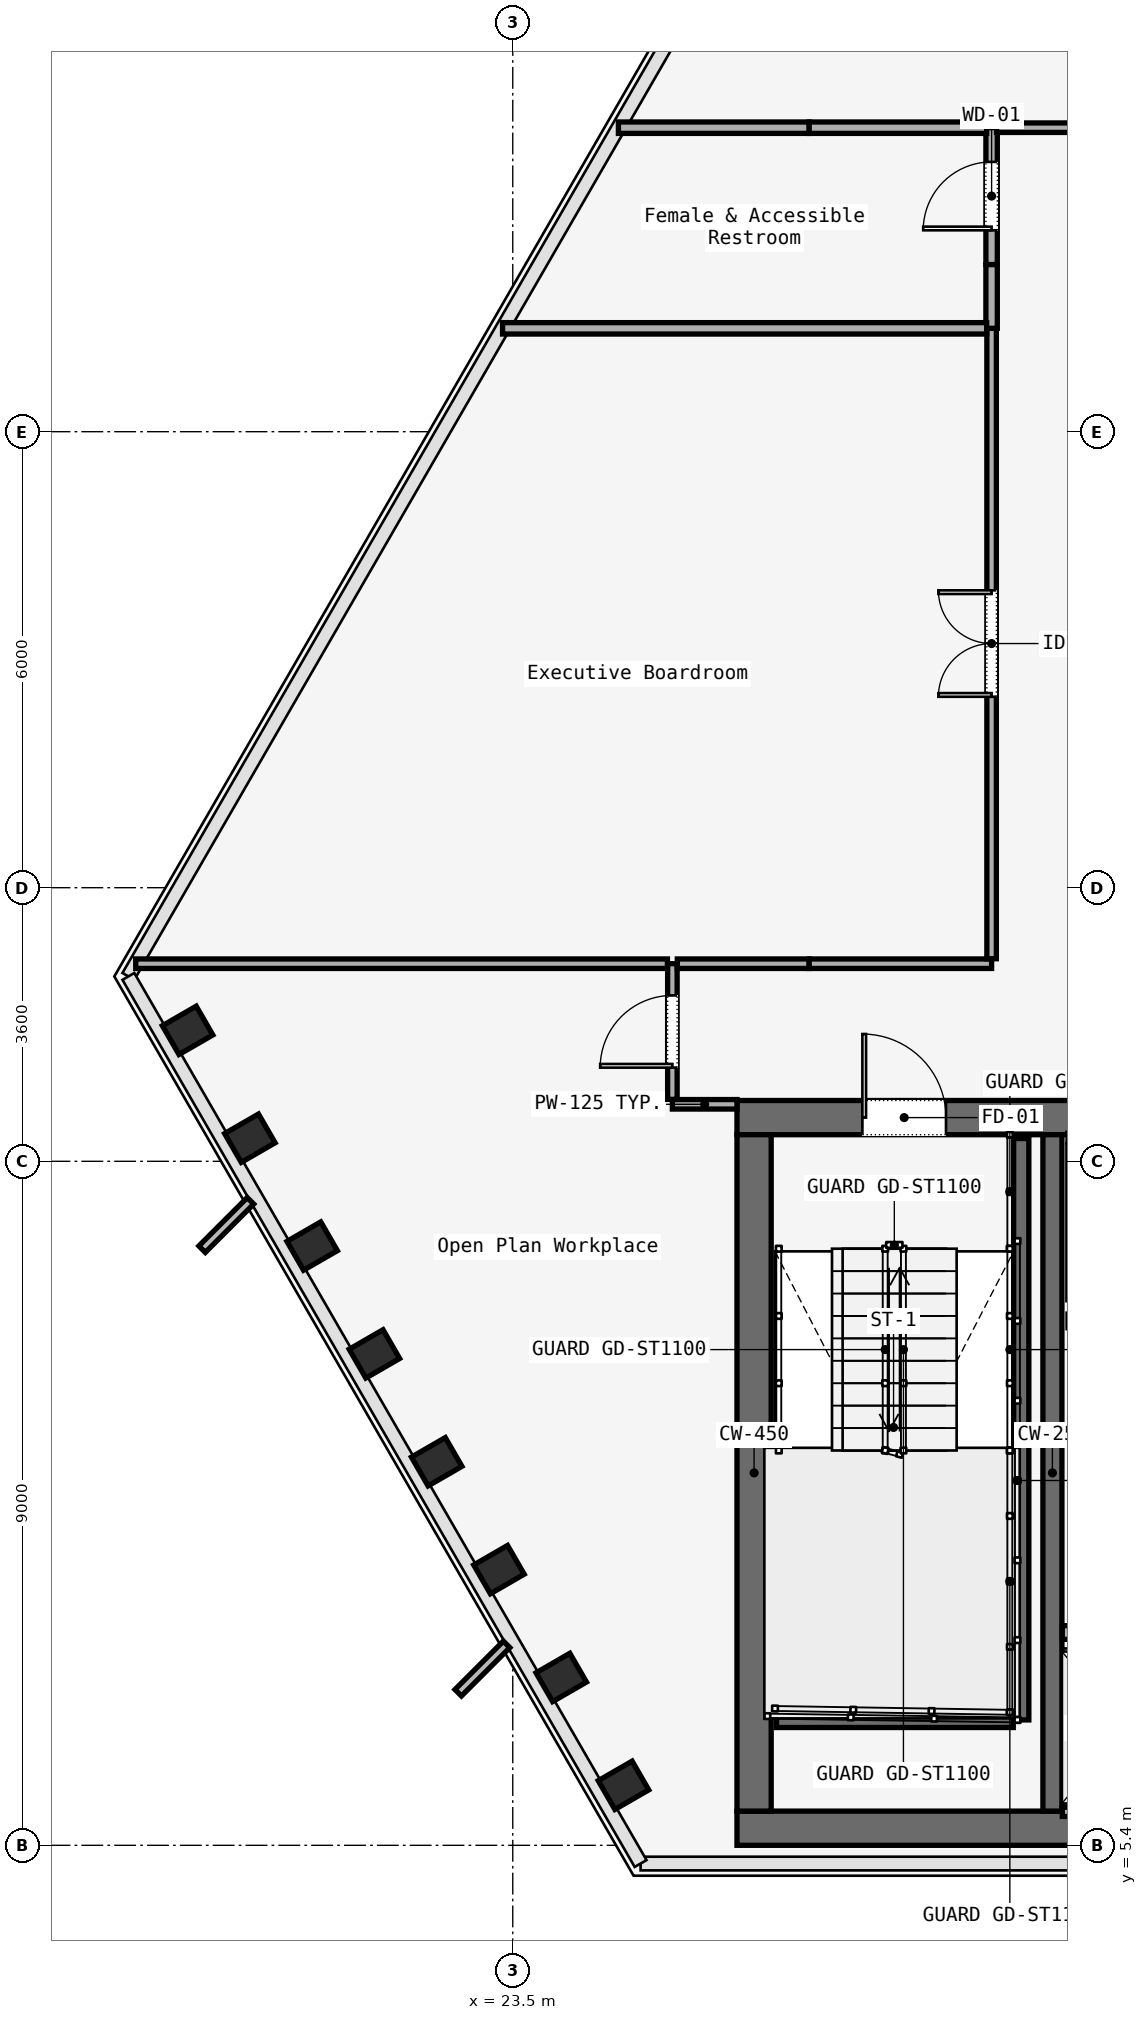
"""IFC4 building model, lengths in metres.
Left out: names, types, materials, properties, quantities, classifications, styles, units other than length and angle.
Written with IfcOpenShell. Run it as: python <this file> out.ifc"""

import sys

from ifc_helpers import new_model, si_unit, direction, frame, frame_2d, origin, origin_2d, place, context, subcontext, project, spatial, rectangle, i_section, extrude, element, fill, save


model = new_model("IFC4")
c1 = context("Model", 3, precision=1e-05, world=origin(), true_north=direction((0.0, 1.0)))
c2 = subcontext(c1, "Body", "Model", "MODEL_VIEW")
j1 = project(units=[si_unit("LENGTHUNIT", "METRE"), si_unit("PLANEANGLEUNIT", "RADIAN")], contexts=[c1])
p1 = place(None, origin())
s1 = spatial("IfcSite", under=j1, at=p1, CompositionType="ELEMENT")
p2 = place(p1, origin())
s2 = spatial("IfcBuilding", under=s1, at=p2, CompositionType="ELEMENT")
p3 = place(p2, frame((0.0, 0.0, 108.2)))
s3 = spatial("IfcBuildingStorey", under=s2, at=p3, CompositionType="ELEMENT", Elevation=108.2)
p4 = place(p3, frame((26.45, 14.975, 0.0), z_axis=(0.0, 0.0, 1.0), x_axis=(1.0, 0.0, 0.0)))
e1 = element("IfcWall", 1, at=p4, inside=s3, PredefinedType="SOLIDWALL", context=c2, shape_type="SweptSolid", body=[
    extrude(rectangle(XDim=31.1, YDim=0.45, at=frame_2d((15.55, 0.0))), origin(), (0.0, 0.0, 1.0), 3.52),
])
p5 = place(p4, frame((1.65, 0.0, 0.0)))
e2 = element("IfcOpeningElement", 2, at=p5, cuts=e1, PredefinedType="OPENING", context=c2, shape_type="SweptSolid", body=[
    extrude(rectangle(XDim=1.1, YDim=2.2, at=frame_2d((0.55, 1.1))), frame((0.0, 0.225, 0.0), z_axis=(0.0, -1.0, 0.0), x_axis=(1.0, 0.0, 0.0)), (0.0, 0.0, 1.0), 0.45),
])
p6 = place(p4, frame((13.65, 0.0, 0.0)))
e3 = element("IfcOpeningElement", 3, at=p6, cuts=e1, PredefinedType="OPENING", context=c2, shape_type="SweptSolid", body=[
    extrude(rectangle(XDim=1.1, YDim=2.2, at=frame_2d((0.55, 1.1))), frame((0.0, 0.225, 0.0), z_axis=(0.0, -1.0, 0.0), x_axis=(1.0, 0.0, 0.0)), (0.0, 0.0, 1.0), 0.45),
])
p7 = place(p4, frame((25.55, 0.0, 0.0)))
e4 = element("IfcOpeningElement", 4, at=p7, cuts=e1, PredefinedType="OPENING", context=c2, shape_type="SweptSolid", body=[
    extrude(rectangle(XDim=1.1, YDim=2.2, at=frame_2d((0.55, 1.1))), frame((0.0, 0.225, 0.0), z_axis=(0.0, -1.0, 0.0), x_axis=(1.0, 0.0, 0.0)), (0.0, 0.0, 1.0), 0.45),
])
p8 = place(p4, frame((10.7, 0.0, 0.0)))
e5 = element("IfcOpeningElement", 5, at=p8, cuts=e1, PredefinedType="OPENING", context=c2, shape_type="SweptSolid", body=[
    extrude(rectangle(XDim=1.4, YDim=2.2, at=frame_2d((0.7, 1.1))), frame((0.0, 0.225, 0.0), z_axis=(0.0, -1.0, 0.0), x_axis=(1.0, 0.0, 0.0)), (0.0, 0.0, 1.0), 0.45),
])
p9 = place(p4, frame((19.35, 0.0, 0.0)))
e6 = element("IfcOpeningElement", 6, at=p9, cuts=e1, PredefinedType="OPENING", context=c2, shape_type="SweptSolid", body=[
    extrude(rectangle(XDim=1.1, YDim=2.2, at=frame_2d((0.55, 1.1))), frame((0.0, 0.225, 0.0), z_axis=(0.0, -1.0, 0.0), x_axis=(1.0, 0.0, 0.0)), (0.0, 0.0, 1.0), 0.45),
])
p10 = place(p4, frame((21.4, 0.0, 0.0)))
e7 = element("IfcOpeningElement", 7, at=p10, cuts=e1, PredefinedType="OPENING", context=c2, shape_type="SweptSolid", body=[
    extrude(rectangle(XDim=0.9, YDim=2.1, at=frame_2d((0.45, 1.05))), frame((0.0, 0.225, 0.0), z_axis=(0.0, -1.0, 0.0), x_axis=(1.0, 0.0, 0.0)), (0.0, 0.0, 1.0), 0.45),
])
p11 = place(p4, frame((23.35, 0.0, 0.0)))
e8 = element("IfcOpeningElement", 8, at=p11, cuts=e1, PredefinedType="OPENING", context=c2, shape_type="SweptSolid", body=[
    extrude(rectangle(XDim=1.3, YDim=2.3, at=frame_2d((0.65, 1.15))), frame((0.0, 0.225, 0.0), z_axis=(0.0, -1.0, 0.0), x_axis=(1.0, 0.0, 0.0)), (0.0, 0.0, 1.0), 0.45),
])
p12 = place(p3, frame((26.45, 5.625, 0.0), z_axis=(0.0, 0.0, 1.0), x_axis=(1.0, 0.0, 0.0)))
e9 = element("IfcWall", 9, at=p12, inside=s3, PredefinedType="SOLIDWALL", context=c2, shape_type="SweptSolid", body=[
    extrude(rectangle(XDim=31.1, YDim=0.45, at=frame_2d((15.55, 0.0))), origin(), (0.0, 0.0, 1.0), 3.52),
])
p13 = place(p3, frame((26.675, 5.85, 0.0), z_axis=(0.0, 0.0, 1.0), x_axis=(0.0, 1.0, 0.0)))
e10 = element("IfcWall", 10, at=p13, inside=s3, PredefinedType="SOLIDWALL", context=c2, shape_type="SweptSolid", body=[
    extrude(rectangle(XDim=8.9, YDim=0.45, at=frame_2d((4.45, 0.0))), origin(), (0.0, 0.0, 1.0), 3.52),
])
p14 = place(p3, frame((30.6, 5.85, 0.0), z_axis=(0.0, 0.0, 1.0), x_axis=(0.0, 1.0, 0.0)))
e11 = element("IfcWall", 11, at=p14, inside=s3, PredefinedType="SOLIDWALL", context=c2, shape_type="SweptSolid", body=[
    extrude(rectangle(XDim=8.9, YDim=0.25, at=frame_2d((4.45, 0.0))), origin(), (0.0, 0.0, 1.0), 3.52),
])
p15 = place(p3, frame((19.222, 16.123, 0.0), z_axis=(-0.016597028871, -0.173141844397, 0.984757046358), x_axis=(-0.416341492097, 0.896643514571, 0.150632565325)))
e12 = element("IfcColumn", 12, at=p15, inside=s3, PredefinedType="COLUMN", context=c2, shape_type="SweptSolid", body=[
    extrude(i_section(OverallWidth=0.437, OverallDepth=0.514, WebThickness=0.061, FlangeThickness=0.077, FilletRadius=0.015, at=origin_2d()), origin(), (0.0, 0.0, 1.0), 3.574),
])
p16 = place(p3, frame((20.041, 14.704, 0.0), z_axis=(-0.030086971203, -0.1505719265, 0.988141118016), x_axis=(-0.322626983526, 0.937138720434, 0.132976870788)))
e13 = element("IfcColumn", 13, at=p16, inside=s3, PredefinedType="COLUMN", context=c2, shape_type="SweptSolid", body=[
    extrude(i_section(OverallWidth=0.437, OverallDepth=0.514, WebThickness=0.061, FlangeThickness=0.077, FilletRadius=0.015, at=origin_2d()), origin(), (0.0, 0.0, 1.0), 3.562),
])
p17 = place(p3, frame((20.861, 13.285, 0.0), z_axis=(-0.043570760705, -0.127688443832, 0.990856826249), x_axis=(-0.196088913987, 0.973600059267, 0.116842040411)))
e14 = element("IfcColumn", 14, at=p17, inside=s3, PredefinedType="COLUMN", context=c2, shape_type="SweptSolid", body=[
    extrude(i_section(OverallWidth=0.437, OverallDepth=0.514, WebThickness=0.061, FlangeThickness=0.077, FilletRadius=0.015, at=origin_2d()), origin(), (0.0, 0.0, 1.0), 3.552),
])
p18 = place(p3, frame((21.68, 11.866, 0.0), z_axis=(-0.057018391057, -0.104740305311, 0.992863722534), x_axis=(-0.028033854461, 0.994257452397, 0.103277400028)))
e15 = element("IfcColumn", 15, at=p18, inside=s3, PredefinedType="COLUMN", context=c2, shape_type="SweptSolid", body=[
    extrude(i_section(OverallWidth=0.437, OverallDepth=0.514, WebThickness=0.061, FlangeThickness=0.077, FilletRadius=0.015, at=origin_2d()), origin(), (0.0, 0.0, 1.0), 3.545),
])
p19 = place(p3, frame((22.499, 10.447, 0.0), z_axis=(-0.070539187226, -0.081571709177, 0.994168134335), x_axis=(0.184962847844, 0.97829773301, 0.093393203738)))
e16 = element("IfcColumn", 16, at=p19, inside=s3, PredefinedType="COLUMN", context=c2, shape_type="SweptSolid", body=[
    extrude(i_section(OverallWidth=0.437, OverallDepth=0.514, WebThickness=0.061, FlangeThickness=0.077, FilletRadius=0.015, at=origin_2d()), origin(), (0.0, 0.0, 1.0), 3.541),
])
p20 = place(p3, frame((23.318, 9.028, 0.0), z_axis=(-0.084102893328, -0.058368373876, 0.994746116487), x_axis=(0.422655646103, 0.901943502674, 0.088657333601)))
e17 = element("IfcColumn", 17, at=p20, inside=s3, PredefinedType="COLUMN", context=c2, shape_type="SweptSolid", body=[
    extrude(i_section(OverallWidth=0.437, OverallDepth=0.514, WebThickness=0.061, FlangeThickness=0.077, FilletRadius=0.015, at=origin_2d()), origin(), (0.0, 0.0, 1.0), 3.539),
])
p21 = place(p3, frame((24.138, 7.609, 0.0), z_axis=(-0.0975438825, -0.034975069609, 0.994616476584), x_axis=(0.642059401793, 0.761384381367, 0.089741564398)))
e18 = element("IfcColumn", 18, at=p21, inside=s3, PredefinedType="COLUMN", context=c2, shape_type="SweptSolid", body=[
    extrude(i_section(OverallWidth=0.437, OverallDepth=0.514, WebThickness=0.061, FlangeThickness=0.077, FilletRadius=0.015, at=origin_2d()), origin(), (0.0, 0.0, 1.0), 3.539),
])
p22 = place(p3, frame((24.957, 6.19, 0.0), z_axis=(-0.110900524315, -0.011717271059, 0.993762436031), x_axis=(0.803324310998, 0.587658817519, 0.096577251725)))
e19 = element("IfcColumn", 19, at=p22, inside=s3, PredefinedType="COLUMN", context=c2, shape_type="SweptSolid", body=[
    extrude(i_section(OverallWidth=0.437, OverallDepth=0.514, WebThickness=0.061, FlangeThickness=0.077, FilletRadius=0.015, at=origin_2d()), origin(), (0.0, 0.0, 1.0), 3.542),
])
p23 = place(p3, frame((30.19, 14.7, 0.0), z_axis=(0.0, 0.0, 1.0), x_axis=(0.0, -1.0, 0.0)))
e20 = element("IfcWall", 20, at=p23, inside=s3, PredefinedType="SOLIDWALL", context=c2, shape_type="SweptSolid", body=[
    extrude(rectangle(XDim=7.65, YDim=0.2, at=frame_2d((3.825, 0.0))), origin(), (0.0, 0.0, 1.0), 3.8),
])
p24 = place(p3, frame((26.97, 7.05, 0.0), z_axis=(0.0, 0.0, 1.0), x_axis=(1.0, 0.0, 0.0)))
e21 = element("IfcWall", 21, at=p24, inside=s3, PredefinedType="SOLIDWALL", context=c2, shape_type="SweptSolid", body=[
    extrude(rectangle(XDim=3.115, YDim=0.2, at=frame_2d((1.558, 0.0))), origin(), (0.0, 0.0, 1.0), 3.8),
])
p25 = place(p3, frame((30.73, 8.2, 0.0), z_axis=(0.0, 0.0, 1.0), x_axis=(1.0, 0.0, 0.0)))
e22 = element("IfcWall", 22, at=p25, inside=s3, PredefinedType="SOLIDWALL", context=c2, shape_type="SweptSolid", body=[
    extrude(rectangle(XDim=1.665, YDim=0.18, at=frame_2d((0.833, 0.0))), origin(), (0.0, 0.0, 1.0), 2.95),
])
p26 = place(p25, frame((0.282, 0.0, 0.0)))
e23 = element("IfcOpeningElement", 23, at=p26, cuts=e22, PredefinedType="OPENING", context=c2, shape_type="SweptSolid", body=[
    extrude(rectangle(XDim=1.1, YDim=2.2, at=frame_2d((0.55, 1.1))), frame((0.0, 0.09, 0.0), z_axis=(0.0, -1.0, 0.0), x_axis=(1.0, 0.0, 0.0)), (0.0, 0.0, 1.0), 0.18),
])
p27 = place(p3, frame((30.73, 5.84, 0.0), z_axis=(0.0, 0.0, 1.0), x_axis=(1.0, 0.0, 0.0)))
e24 = element("IfcWall", 24, at=p27, inside=s3, PredefinedType="SOLIDWALL", context=c2, shape_type="SweptSolid", body=[
    extrude(rectangle(XDim=1.665, YDim=0.12, at=frame_2d((0.833, 0.0))), origin(), (0.0, 0.0, 1.0), 2.95),
])
p28 = place(p3, frame((26.45, 15.15, 0.0), z_axis=(0.0, 0.0, 1.0), x_axis=(-1.0, 0.0, 0.0)))
e25 = element("IfcWall", 25, at=p28, inside=s3, PredefinedType="PARTITIONING", context=c2, shape_type="SweptSolid", body=[
    extrude(rectangle(XDim=0.85, YDim=0.125, at=frame_2d((0.425, 0.0))), origin(), (0.0, 0.0, 1.0), 2.95),
])
p29 = place(p3, frame((25.6, 15.215, 0.0), z_axis=(0.0, 0.0, 1.0), x_axis=(0.0, 1.0, 0.0)))
e26 = element("IfcWall", 26, at=p29, inside=s3, PredefinedType="PARTITIONING", context=c2, shape_type="SweptSolid", body=[
    extrude(rectangle(XDim=1.785, YDim=0.125, at=frame_2d((0.893, 0.0))), origin(), (0.0, 0.0, 1.0), 2.95),
])
p30 = place(p29, frame((0.417, 0.0, 0.0)))
e27 = element("IfcOpeningElement", 27, at=p30, cuts=e26, PredefinedType="OPENING", context=c2, shape_type="SweptSolid", body=[
    extrude(rectangle(XDim=0.95, YDim=2.2, at=frame_2d((0.475, 1.1))), frame((0.0, 0.062, 0.0), z_axis=(0.0, -1.0, 0.0), x_axis=(1.0, 0.0, 0.0)), (0.0, 0.0, 1.0), 0.125),
])
p31 = place(p3, frame((25.665, 17.0, 0.0), z_axis=(0.0, 0.0, 1.0), x_axis=(1.0, 0.0, 0.0)))
e28 = element("IfcWall", 28, at=p31, inside=s3, PredefinedType="PARTITIONING", context=c2, shape_type="SweptSolid", body=[
    extrude(rectangle(XDim=1.735, YDim=0.125, at=frame_2d((0.867, 0.0))), origin(), (0.0, 0.0, 1.0), 2.95),
])
p32 = place(p3, frame((27.4, 17.0, 0.0), z_axis=(0.0, 0.0, 1.0), x_axis=(1.0, 0.0, 0.0)))
e29 = element("IfcWall", 29, at=p32, inside=s3, PredefinedType="PARTITIONING", context=c2, shape_type="SweptSolid", body=[
    extrude(rectangle(XDim=2.4, YDim=0.125, at=frame_2d((1.2, 0.0))), origin(), (0.0, 0.0, 1.0), 2.95),
])
p33 = place(p3, frame((29.8, 17.065, 0.0), z_axis=(0.0, 0.0, 1.0), x_axis=(0.0, 1.0, 0.0)))
e30 = element("IfcWall", 30, at=p33, inside=s3, PredefinedType="PARTITIONING", context=c2, shape_type="SweptSolid", body=[
    extrude(rectangle(XDim=8.295, YDim=0.125, at=frame_2d((4.147, 0.0))), origin(), (0.0, 0.0, 1.0), 2.95),
])
p34 = place(p33, frame((3.448, 0.0, 0.0)))
e31 = element("IfcOpeningElement", 31, at=p34, cuts=e30, PredefinedType="OPENING", context=c2, shape_type="SweptSolid", body=[
    extrude(rectangle(XDim=1.4, YDim=2.2, at=frame_2d((0.7, 1.1))), frame((0.0, 0.062, 0.0), z_axis=(0.0, -1.0, 0.0), x_axis=(1.0, 0.0, 0.0)), (0.0, 0.0, 1.0), 0.125),
])
p35 = place(p3, frame((29.8, 25.36, 0.0), z_axis=(0.0, 0.0, 1.0), x_axis=(0.0, 1.0, 0.0)))
e32 = element("IfcWall", 32, at=p35, inside=s3, PredefinedType="PARTITIONING", context=c2, shape_type="SweptSolid", body=[
    extrude(rectangle(XDim=0.84, YDim=0.15, at=frame_2d((0.42, 0.0))), origin(), (0.0, 0.0, 1.0), 2.95),
])
p36 = place(p3, frame((29.8, 26.2, 0.0), z_axis=(0.0, 0.0, 1.0), x_axis=(0.0, 1.0, 0.0)))
e33 = element("IfcWall", 33, at=p36, inside=s3, PredefinedType="PARTITIONING", context=c2, shape_type="SweptSolid", body=[
    extrude(rectangle(XDim=1.8, YDim=0.15, at=frame_2d((0.9, 0.0))), origin(), (0.0, 0.0, 1.0), 2.95),
])
p37 = place(p36, frame((0.45, 0.0, 0.0)))
e34 = element("IfcOpeningElement", 34, at=p37, cuts=e33, PredefinedType="OPENING", context=c2, shape_type="SweptSolid", body=[
    extrude(rectangle(XDim=0.9, YDim=2.15, at=frame_2d((0.45, 1.075))), frame((0.0, 0.075, 0.0), z_axis=(0.0, -1.0, 0.0), x_axis=(1.0, 0.0, 0.0)), (0.0, 0.0, 1.0), 0.15),
])
p38 = place(p3, frame((29.865, 28.0, 0.0), z_axis=(0.0, 0.0, 1.0), x_axis=(1.0, 0.0, 0.0)))
e35 = element("IfcWall", 35, at=p38, inside=s3, PredefinedType="PARTITIONING", context=c2, shape_type="SweptSolid", body=[
    extrude(rectangle(XDim=1.735, YDim=0.125, at=frame_2d((0.868, 0.0))), origin(), (0.0, 0.0, 1.0), 2.95),
])
p39 = place(p3, frame((18.539, 17.0, 0.0), z_axis=(0.0, 0.0, 1.0), x_axis=(1.0, 0.0, 0.0)))
e36 = element("IfcWall", 36, at=p39, inside=s3, PredefinedType="PARTITIONING", context=c2, shape_type="SweptSolid", body=[
    extrude(rectangle(XDim=6.996, YDim=0.125, at=frame_2d((3.498, 0.0))), origin(), (0.0, 0.0, 1.0), 2.95),
])
p40 = place(p3, frame((23.366, 25.36, 0.0), z_axis=(0.0, 0.0, 1.0), x_axis=(1.0, 0.0, 0.0)))
e37 = element("IfcWall", 37, at=p40, inside=s3, PredefinedType="PARTITIONING", context=c2, shape_type="SweptSolid", body=[
    extrude(rectangle(XDim=6.369, YDim=0.15, at=frame_2d((3.185, 0.0))), origin(), (0.0, 0.0, 1.0), 2.95),
])
p41 = place(p3, frame((24.89, 28.0, 0.0), z_axis=(0.0, 0.0, 1.0), x_axis=(1.0, 0.0, 0.0)))
e38 = element("IfcWall", 38, at=p41, inside=s3, PredefinedType="PARTITIONING", context=c2, shape_type="SweptSolid", body=[
    extrude(rectangle(XDim=2.51, YDim=0.15, at=frame_2d((1.255, 0.0))), origin(), (0.0, 0.0, 1.0), 2.95),
])
p42 = place(p3, frame((27.4, 28.0, 0.0), z_axis=(0.0, 0.0, 1.0), x_axis=(1.0, 0.0, 0.0)))
e39 = element("IfcWall", 39, at=p42, inside=s3, PredefinedType="PARTITIONING", context=c2, shape_type="SweptSolid", body=[
    extrude(rectangle(XDim=2.335, YDim=0.15, at=frame_2d((1.167, 0.0))), origin(), (0.0, 0.0, 1.0), 2.95),
])
p43 = place(p5, origin())
e40 = element("IfcDoor", 40, at=p43, inside=s3, OperationType="SINGLE_SWING_RIGHT", PredefinedType="DOOR", context=c2, shape_type="SweptSolid", body=[
    extrude(rectangle(XDim=1.1, YDim=2.2, at=frame_2d((0.55, 1.1))), frame((0.0, 0.025, 0.0), z_axis=(0.0, -1.0, 0.0), x_axis=(1.0, 0.0, 0.0)), (0.0, 0.0, 1.0), 0.05),
])
fill(e2, e40)
p44 = place(p30, origin())
e41 = element("IfcDoor", 41, at=p44, inside=s3, OperationType="SINGLE_SWING_RIGHT", PredefinedType="DOOR", context=c2, shape_type="SweptSolid", body=[
    extrude(rectangle(XDim=0.95, YDim=2.2, at=frame_2d((0.475, 1.1))), frame((0.0, 0.025, 0.0), z_axis=(0.0, -1.0, 0.0), x_axis=(1.0, 0.0, 0.0)), (0.0, 0.0, 1.0), 0.05),
])
fill(e27, e41)
p45 = place(p34, origin())
e42 = element("IfcDoor", 42, at=p45, inside=s3, OperationType="SINGLE_SWING_RIGHT", PredefinedType="DOOR", context=c2, shape_type="SweptSolid", body=[
    extrude(rectangle(XDim=1.4, YDim=2.2, at=frame_2d((0.7, 1.1))), frame((0.0, 0.025, 0.0), z_axis=(0.0, -1.0, 0.0), x_axis=(1.0, 0.0, 0.0)), (0.0, 0.0, 1.0), 0.05),
])
fill(e31, e42)
p46 = place(p37, origin())
e43 = element("IfcDoor", 43, at=p46, inside=s3, OperationType="SINGLE_SWING_LEFT", PredefinedType="DOOR", context=c2, shape_type="SweptSolid", body=[
    extrude(rectangle(XDim=0.9, YDim=2.15, at=frame_2d((0.45, 1.075))), frame((0.0, 0.025, 0.0), z_axis=(0.0, -1.0, 0.0), x_axis=(1.0, 0.0, 0.0)), (0.0, 0.0, 1.0), 0.05),
])
fill(e34, e43)
save(model, sys.argv[1])
